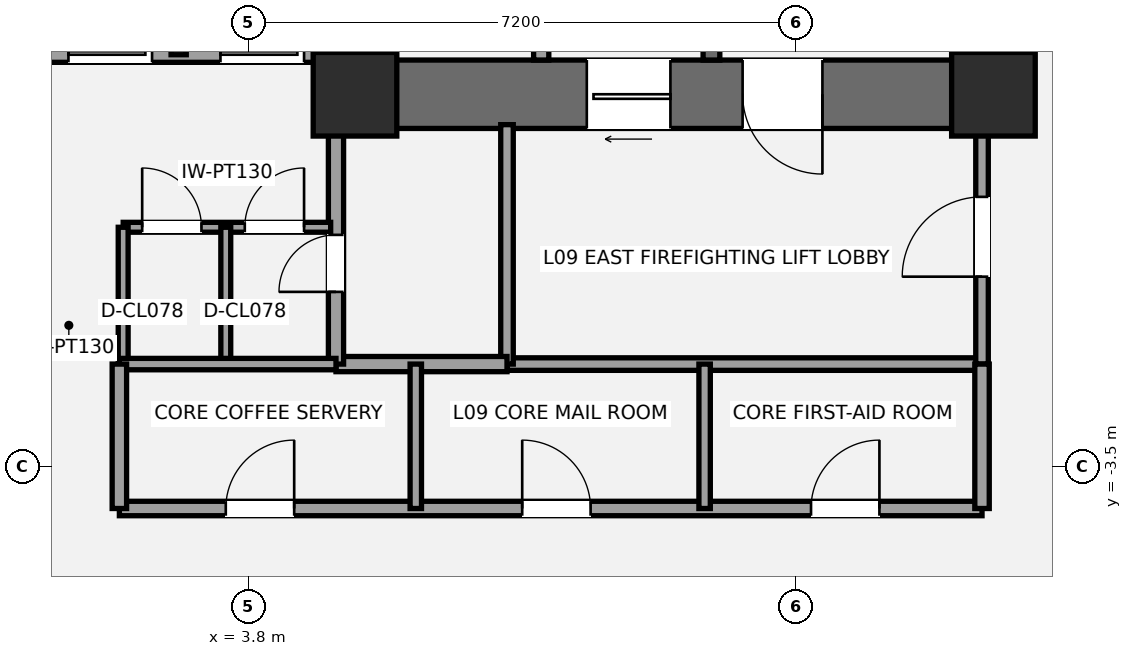
"""IFC4 building model, lengths in metres.
Left out: names, types, materials, properties, quantities, classifications, styles, units other than length and angle.
Written with IfcOpenShell. Run it as: python <this file> out.ifc"""

import sys

from ifc_helpers import new_model, si_unit, direction, frame, frame_2d, origin, origin_2d, place, context, subcontext, project, spatial, rectangle, extrude, element, fill, save


model = new_model("IFC4")
c1 = context("Model", 3, precision=1e-05, world=origin(), true_north=direction((0.0, 1.0)))
c2 = subcontext(c1, "Body", "Model", "MODEL_VIEW")
j1 = project(units=[si_unit("LENGTHUNIT", "METRE"), si_unit("PLANEANGLEUNIT", "RADIAN")], contexts=[c1])
p1 = place(None, origin())
s1 = spatial("IfcSite", under=j1, at=p1, CompositionType="ELEMENT")
p2 = place(p1, origin())
s2 = spatial("IfcBuilding", under=s1, at=p2, CompositionType="ELEMENT")
p3 = place(p2, frame((0.0, 0.0, 37.8)))
s3 = spatial("IfcBuildingStorey", under=s2, at=p3, CompositionType="ELEMENT", Elevation=37.8)
p4 = place(p3, frame((13.6, 0.95, 0.0), z_axis=(0.0, 0.0, 1.0), x_axis=(0.0, 1.0, 0.0)))
e1 = element("IfcWall", 1, at=p4, inside=s3, PredefinedType="SHEAR", context=c2, shape_type="SweptSolid", body=[
    extrude(rectangle(XDim=8.95, YDim=0.9, at=frame_2d((4.475, 0.0))), origin(), (0.0, 0.0, 1.0), 3.6),
])
p5 = place(p3, frame((14.05, 1.4, 0.0), z_axis=(0.0, 0.0, 1.0), x_axis=(-1.0, 0.0, 0.0)))
e2 = element("IfcWall", 2, at=p5, inside=s3, PredefinedType="SHEAR", context=c2, shape_type="SweptSolid", body=[
    extrude(rectangle(XDim=9.3, YDim=0.9, at=frame_2d((4.65, 0.0))), origin(), (0.0, 0.0, 1.0), 3.6),
])
p6 = place(p5, frame((2.7, 0.0, 0.0)))
e3 = element("IfcOpeningElement", 3, at=p6, cuts=e2, PredefinedType="OPENING", context=c2, shape_type="SweptSolid", body=[
    extrude(rectangle(XDim=1.05, YDim=2.15, at=frame_2d((0.525, 1.075))), frame((0.0, 0.46, 0.0), z_axis=(0.0, -1.0, 0.0), x_axis=(1.0, 0.0, 0.0)), (0.0, 0.0, 1.0), 0.92),
])
p7 = place(p5, frame((4.7, 0.0, 0.0)))
e4 = element("IfcOpeningElement", 4, at=p7, cuts=e2, PredefinedType="OPENING", context=c2, shape_type="SweptSolid", body=[
    extrude(rectangle(XDim=1.1, YDim=2.2, at=frame_2d((0.55, 1.1))), frame((0.0, 0.46, 0.0), z_axis=(0.0, -1.0, 0.0), x_axis=(1.0, 0.0, 0.0)), (0.0, 0.0, 1.0), 0.92),
])
p8 = place(p3, frame((5.2, 0.95, 0.0), z_axis=(0.0, 0.0, 1.0), x_axis=(0.0, 1.0, 0.0)))
e5 = element("IfcWall", 5, at=p8, inside=s3, PredefinedType="SHEAR", context=c2, shape_type="SweptSolid", body=[
    extrude(rectangle(XDim=2.85, YDim=0.9, at=frame_2d((1.425, 0.0))), origin(), (0.0, 0.0, 1.0), 3.6),
])
p9 = place(p3, frame((9.89, 1.85, 0.0), z_axis=(0.0, 0.0, 1.0), x_axis=(0.0, 1.0, 0.0)))
e6 = element("IfcWall", 6, at=p9, inside=s3, PredefinedType="SHEAR", context=c2, shape_type="SweptSolid", body=[
    extrude(rectangle(XDim=7.15, YDim=0.22, at=frame_2d((3.575, 0.0))), origin(), (0.0, 0.0, 1.0), 3.6),
])
for number, where, z_axis, x_axis in (
    (7, (5.2, 1.4, 0.0), (0.0, 0.0, 1.0), (1.0, 0.0, 0.0)),
    (8, (13.6, 1.4, 0.0), (0.0, 0.0, 1.0), (1.0, 0.0, 0.0)),
):
    element("IfcColumn", number, at=place(p3, frame(where, z_axis=z_axis, x_axis=x_axis)), inside=s3, PredefinedType="COLUMN", context=c2, shape_type="SweptSolid", body=[
        extrude(rectangle(XDim=1.1, YDim=1.1, at=origin_2d()), origin(), (0.0, 0.0, 1.0), 3.6),
    ])
p10 = place(p3, frame((7.2, -2.15, 0.0), z_axis=(0.0, 0.0, 1.0), x_axis=(1.0, 0.0, 0.0)))
e9 = element("IfcWall", 9, at=p10, inside=s3, PredefinedType="PARTITIONING", context=c2, shape_type="SweptSolid", body=[
    extrude(rectangle(XDim=6.25, YDim=0.165, at=frame_2d((3.125, 0.0))), origin(), (0.0, 0.0, 1.0), 3.4),
])
p11 = place(p3, frame((7.2, -2.15, 0.0), z_axis=(0.0, 0.0, 1.0), x_axis=(0.0, 1.0, 0.0)))
e10 = element("IfcWall", 10, at=p11, inside=s3, PredefinedType="PARTITIONING", context=c2, shape_type="SweptSolid", body=[
    extrude(rectangle(XDim=3.15, YDim=0.165, at=frame_2d((1.575, 0.0))), origin(), (0.0, 0.0, 1.0), 2.853),
])
p12 = place(p3, frame((13.45, -2.15, 0.0), z_axis=(0.0, 0.0, 1.0), x_axis=(0.0, 1.0, 0.0)))
e11 = element("IfcWall", 11, at=p12, inside=s3, PredefinedType="PARTITIONING", context=c2, shape_type="SweptSolid", body=[
    extrude(rectangle(XDim=3.15, YDim=0.165, at=frame_2d((1.575, 0.0))), origin(), (0.0, 0.0, 1.0), 2.853),
])
p13 = place(p12, frame((1.15, 0.0, 0.0)))
e12 = element("IfcOpeningElement", 12, at=p13, cuts=e11, PredefinedType="OPENING", context=c2, shape_type="SweptSolid", body=[
    extrude(rectangle(XDim=1.05, YDim=2.15, at=frame_2d((0.525, 1.075))), frame((0.0, 0.093, 0.0), z_axis=(0.0, -1.0, 0.0), x_axis=(1.0, 0.0, 0.0)), (0.0, 0.0, 1.0), 0.185),
])
p14 = place(p3, frame((4.95, -2.15, 0.0), z_axis=(0.0, 0.0, 1.0), x_axis=(1.0, 0.0, 0.0)))
e13 = element("IfcWall", 13, at=p14, inside=s3, PredefinedType="SOLIDWALL", context=c2, shape_type="SweptSolid", body=[
    extrude(rectangle(XDim=2.25, YDim=0.2, at=frame_2d((1.125, 0.0))), origin(), (0.0, 0.0, 1.0), 3.4),
])
p15 = place(p3, frame((4.95, -2.15, 0.0), z_axis=(0.0, 0.0, 1.0), x_axis=(0.0, 1.0, 0.0)))
e14 = element("IfcWall", 14, at=p15, inside=s3, PredefinedType="SOLIDWALL", context=c2, shape_type="SweptSolid", body=[
    extrude(rectangle(XDim=3.15, YDim=0.2, at=frame_2d((1.575, 0.0))), origin(), (0.0, 0.0, 1.0), 3.4),
])
p16 = place(p15, frame((0.95, 0.0, 0.0)))
e15 = element("IfcOpeningElement", 15, at=p16, cuts=e14, PredefinedType="OPENING", context=c2, shape_type="SweptSolid", body=[
    extrude(rectangle(XDim=0.75, YDim=2.1, at=frame_2d((0.375, 1.05))), frame((0.0, 0.11, 0.0), z_axis=(0.0, -1.0, 0.0), x_axis=(1.0, 0.0, 0.0)), (0.0, 0.0, 1.0), 0.22),
])
p17 = place(p3, frame((2.15, -0.35, 0.0), z_axis=(0.0, 0.0, 1.0), x_axis=(1.0, 0.0, 0.0)))
e16 = element("IfcWall", 16, at=p17, inside=s3, PredefinedType="PARTITIONING", context=c2, shape_type="SweptSolid", body=[
    extrude(rectangle(XDim=2.73, YDim=0.13, at=frame_2d((1.365, 0.0))), origin(), (0.0, 0.0, 1.0), 3.4),
])
p18 = place(p17, frame((0.25, 0.0, 0.0)))
e17 = element("IfcOpeningElement", 17, at=p18, cuts=e16, PredefinedType="OPENING", context=c2, shape_type="SweptSolid", body=[
    extrude(rectangle(XDim=0.78, YDim=2.1, at=frame_2d((0.39, 1.05))), frame((0.0, 0.075, 0.0), z_axis=(0.0, -1.0, 0.0), x_axis=(1.0, 0.0, 0.0)), (0.0, 0.0, 1.0), 0.15),
])
p19 = place(p17, frame((1.6, 0.0, 0.0)))
e18 = element("IfcOpeningElement", 18, at=p19, cuts=e16, PredefinedType="OPENING", context=c2, shape_type="SweptSolid", body=[
    extrude(rectangle(XDim=0.78, YDim=2.1, at=frame_2d((0.39, 1.05))), frame((0.0, 0.075, 0.0), z_axis=(0.0, -1.0, 0.0), x_axis=(1.0, 0.0, 0.0)), (0.0, 0.0, 1.0), 0.15),
])
for number, where, z_axis, x_axis in (
    (19, (2.15, -2.15, 0.0), (0.0, 0.0, 1.0), (0.0, 1.0, 0.0)),
    (20, (3.5, -2.15, 0.0), (0.0, 0.0, 1.0), (0.0, 1.0, 0.0)),
):
    element("IfcWall", number, at=place(p3, frame(where, z_axis=z_axis, x_axis=x_axis)), inside=s3, PredefinedType="PARTITIONING", context=c2, shape_type="SweptSolid", body=[
        extrude(rectangle(XDim=1.8, YDim=0.13, at=frame_2d((0.9, 0.0))), origin(), (0.0, 0.0, 1.0), 3.4),
    ])
p20 = place(p3, frame((7.65, 1.85, 0.0), z_axis=(0.0, 0.0, 1.0), x_axis=(0.0, 1.0, 0.0)))
e21 = element("IfcWall", 21, at=p20, inside=s3, PredefinedType="SOLIDWALL", context=c2, shape_type="SweptSolid", body=[
    extrude(rectangle(XDim=1.97, YDim=0.2, at=frame_2d((0.985, 0.0))), origin(), (0.0, 0.0, 1.0), 3.4),
])
p21 = place(p3, frame((0.88, 1.92, 0.0), z_axis=(0.0, 0.0, 1.0), x_axis=(1.0, 0.0, 0.0)))
e22 = element("IfcWall", 22, at=p21, inside=s3, PredefinedType="SOLIDWALL", context=c2, shape_type="SweptSolid", body=[
    extrude(rectangle(XDim=3.86, YDim=0.2, at=frame_2d((1.93, 0.0))), origin(), (0.0, 0.0, 1.0), 2.39),
])
p22 = place(p21, frame((0.55, 0.0, 0.0)))
e23 = element("IfcOpeningElement", 23, at=p22, cuts=e22, PredefinedType="OPENING", context=c2, shape_type="SweptSolid", body=[
    extrude(rectangle(XDim=1.1, YDim=2.2, at=frame_2d((0.55, 1.1))), frame((0.0, 0.11, 0.0), z_axis=(0.0, -1.0, 0.0), x_axis=(1.0, 0.0, 0.0)), (0.0, 0.0, 1.0), 0.22),
])
p23 = place(p21, frame((2.55, 0.0, 0.0)))
e24 = element("IfcOpeningElement", 24, at=p23, cuts=e22, PredefinedType="OPENING", context=c2, shape_type="SweptSolid", body=[
    extrude(rectangle(XDim=1.1, YDim=2.2, at=frame_2d((0.55, 1.1))), frame((0.0, 0.11, 0.0), z_axis=(0.0, -1.0, 0.0), x_axis=(1.0, 0.0, 0.0)), (0.0, 0.0, 1.0), 0.22),
])
p24 = place(p3, frame((2.88, 1.92, 0.0), z_axis=(0.0, 0.0, 1.0), x_axis=(0.0, 1.0, 0.0)))
e25 = element("IfcWall", 25, at=p24, inside=s3, PredefinedType="SOLIDWALL", context=c2, shape_type="SweptSolid", body=[
    extrude(rectangle(XDim=1.82, YDim=0.2, at=frame_2d((0.91, 0.0))), origin(), (0.0, 0.0, 1.0), 3.4),
])
p25 = place(p3, frame((2.1, -4.05, 0.0), z_axis=(0.0, 0.0, 1.0), x_axis=(1.0, 0.0, 0.0)))
e26 = element("IfcWall", 26, at=p25, inside=s3, PredefinedType="PLUMBINGWALL", context=c2, shape_type="SweptSolid", body=[
    extrude(rectangle(XDim=11.35, YDim=0.19, at=frame_2d((5.675, 0.0))), origin(), (0.0, 0.0, 1.0), 2.933),
])
p26 = place(p25, frame((1.4, 0.0, 0.0)))
e27 = element("IfcOpeningElement", 27, at=p26, cuts=e26, PredefinedType="OPENING", context=c2, shape_type="SweptSolid", body=[
    extrude(rectangle(XDim=0.9, YDim=2.1, at=frame_2d((0.45, 1.05))), frame((0.0, 0.105, 0.0), z_axis=(0.0, -1.0, 0.0), x_axis=(1.0, 0.0, 0.0)), (0.0, 0.0, 1.0), 0.21),
])
p27 = place(p25, frame((5.3, 0.0, 0.0)))
e28 = element("IfcOpeningElement", 28, at=p27, cuts=e26, PredefinedType="OPENING", context=c2, shape_type="SweptSolid", body=[
    extrude(rectangle(XDim=0.9, YDim=2.1, at=frame_2d((0.45, 1.05))), frame((0.0, 0.105, 0.0), z_axis=(0.0, -1.0, 0.0), x_axis=(1.0, 0.0, 0.0)), (0.0, 0.0, 1.0), 0.21),
])
p28 = place(p25, frame((9.1, 0.0, 0.0)))
e29 = element("IfcOpeningElement", 29, at=p28, cuts=e26, PredefinedType="OPENING", context=c2, shape_type="SweptSolid", body=[
    extrude(rectangle(XDim=0.9, YDim=2.1, at=frame_2d((0.45, 1.05))), frame((0.0, 0.105, 0.0), z_axis=(0.0, -1.0, 0.0), x_axis=(1.0, 0.0, 0.0)), (0.0, 0.0, 1.0), 0.21),
])
p29 = place(p3, frame((2.1, -2.15, 0.0), z_axis=(0.0, 0.0, 1.0), x_axis=(1.0, 0.0, 0.0)))
e30 = element("IfcWall", 30, at=p29, inside=s3, PredefinedType="PLUMBINGWALL", context=c2, shape_type="SweptSolid", body=[
    extrude(rectangle(XDim=2.85, YDim=0.15, at=frame_2d((1.425, 0.0))), origin(), (0.0, 0.0, 1.0), 3.4),
])
p30 = place(p3, frame((2.1, -4.05, 0.0), z_axis=(0.0, 0.0, 1.0), x_axis=(0.0, 1.0, 0.0)))
e31 = element("IfcWall", 31, at=p30, inside=s3, PredefinedType="PLUMBINGWALL", context=c2, shape_type="SweptSolid", body=[
    extrude(rectangle(XDim=1.9, YDim=0.19, at=frame_2d((0.95, 0.0))), origin(), (0.0, 0.0, 1.0), 3.4),
])
p31 = place(p3, frame((13.45, -4.05, 0.0), z_axis=(0.0, 0.0, 1.0), x_axis=(0.0, 1.0, 0.0)))
e32 = element("IfcWall", 32, at=p31, inside=s3, PredefinedType="PLUMBINGWALL", context=c2, shape_type="SweptSolid", body=[
    extrude(rectangle(XDim=1.9, YDim=0.19, at=frame_2d((0.95, 0.0))), origin(), (0.0, 0.0, 1.0), 2.853),
])
p32 = place(p3, frame((6.0, -4.05, 0.0), z_axis=(0.0, 0.0, 1.0), x_axis=(0.0, 1.0, 0.0)))
e33 = element("IfcWall", 33, at=p32, inside=s3, PredefinedType="PLUMBINGWALL", context=c2, shape_type="SweptSolid", body=[
    extrude(rectangle(XDim=1.9, YDim=0.15, at=frame_2d((0.95, 0.0))), origin(), (0.0, 0.0, 1.0), 2.841),
])
p33 = place(p3, frame((9.8, -4.05, 0.0), z_axis=(0.0, 0.0, 1.0), x_axis=(0.0, 1.0, 0.0)))
e34 = element("IfcWall", 34, at=p33, inside=s3, PredefinedType="PLUMBINGWALL", context=c2, shape_type="SweptSolid", body=[
    extrude(rectangle(XDim=1.9, YDim=0.15, at=frame_2d((0.95, 0.0))), origin(), (0.0, 0.0, 1.0), 2.853),
])
p34 = place(p6, origin())
e35 = element("IfcDoor", 35, at=p34, inside=s3, OperationType="SINGLE_SWING_LEFT", PredefinedType="DOOR", context=c2, shape_type="SweptSolid", body=[
    extrude(rectangle(XDim=1.05, YDim=2.15, at=frame_2d((0.525, 1.075))), frame((0.0, 0.025, 0.0), z_axis=(0.0, -1.0, 0.0), x_axis=(1.0, 0.0, 0.0)), (0.0, 0.0, 1.0), 0.05),
])
fill(e3, e35)
p35 = place(p13, origin())
e36 = element("IfcDoor", 36, at=p35, inside=s3, OperationType="SINGLE_SWING_LEFT", PredefinedType="DOOR", context=c2, shape_type="SweptSolid", body=[
    extrude(rectangle(XDim=1.05, YDim=2.15, at=frame_2d((0.525, 1.075))), frame((0.0, 0.025, 0.0), z_axis=(0.0, -1.0, 0.0), x_axis=(1.0, 0.0, 0.0)), (0.0, 0.0, 1.0), 0.05),
])
fill(e12, e36)
p36 = place(p16, origin())
e37 = element("IfcDoor", 37, at=p36, inside=s3, OperationType="SINGLE_SWING_LEFT", PredefinedType="DOOR", context=c2, shape_type="SweptSolid", body=[
    extrude(rectangle(XDim=0.75, YDim=2.1, at=frame_2d((0.375, 1.05))), frame((0.0, 0.025, 0.0), z_axis=(0.0, -1.0, 0.0), x_axis=(1.0, 0.0, 0.0)), (0.0, 0.0, 1.0), 0.05),
])
fill(e15, e37)
p37 = place(p18, origin())
e38 = element("IfcDoor", 38, at=p37, inside=s3, OperationType="SINGLE_SWING_LEFT", PredefinedType="DOOR", context=c2, shape_type="SweptSolid", body=[
    extrude(rectangle(XDim=0.78, YDim=2.1, at=frame_2d((0.39, 1.05))), frame((0.0, 0.025, 0.0), z_axis=(0.0, -1.0, 0.0), x_axis=(1.0, 0.0, 0.0)), (0.0, 0.0, 1.0), 0.05),
])
fill(e17, e38)
p38 = place(p19, origin())
e39 = element("IfcDoor", 39, at=p38, inside=s3, OperationType="SINGLE_SWING_RIGHT", PredefinedType="DOOR", context=c2, shape_type="SweptSolid", body=[
    extrude(rectangle(XDim=0.78, YDim=2.1, at=frame_2d((0.39, 1.05))), frame((0.0, 0.025, 0.0), z_axis=(0.0, -1.0, 0.0), x_axis=(1.0, 0.0, 0.0)), (0.0, 0.0, 1.0), 0.05),
])
fill(e18, e39)
p39 = place(p7, origin())
e40 = element("IfcDoor", 40, at=p39, inside=s3, OperationType="SLIDING_TO_LEFT", PredefinedType="DOOR", context=c2, shape_type="SweptSolid", body=[
    extrude(rectangle(XDim=1.1, YDim=2.2, at=frame_2d((0.55, 1.1))), frame((0.0, 0.025, 0.0), z_axis=(0.0, -1.0, 0.0), x_axis=(1.0, 0.0, 0.0)), (0.0, 0.0, 1.0), 0.05),
])
fill(e4, e40)
p40 = place(p22, origin())
e41 = element("IfcDoor", 41, at=p40, inside=s3, OperationType="SLIDING_TO_LEFT", PredefinedType="DOOR", context=c2, shape_type="SweptSolid", body=[
    extrude(rectangle(XDim=1.1, YDim=2.2, at=frame_2d((0.55, 1.1))), frame((0.0, 0.025, 0.0), z_axis=(0.0, -1.0, 0.0), x_axis=(1.0, 0.0, 0.0)), (0.0, 0.0, 1.0), 0.05),
])
fill(e23, e41)
p41 = place(p23, origin())
e42 = element("IfcDoor", 42, at=p41, inside=s3, OperationType="SLIDING_TO_LEFT", PredefinedType="DOOR", context=c2, shape_type="SweptSolid", body=[
    extrude(rectangle(XDim=1.1, YDim=2.2, at=frame_2d((0.55, 1.1))), frame((0.0, 0.025, 0.0), z_axis=(0.0, -1.0, 0.0), x_axis=(1.0, 0.0, 0.0)), (0.0, 0.0, 1.0), 0.05),
])
fill(e24, e42)
p42 = place(p26, origin())
e43 = element("IfcDoor", 43, at=p42, inside=s3, OperationType="SINGLE_SWING_RIGHT", PredefinedType="DOOR", context=c2, shape_type="SweptSolid", body=[
    extrude(rectangle(XDim=0.9, YDim=2.1, at=frame_2d((0.45, 1.05))), frame((0.0, 0.025, 0.0), z_axis=(0.0, -1.0, 0.0), x_axis=(1.0, 0.0, 0.0)), (0.0, 0.0, 1.0), 0.05),
])
fill(e27, e43)
p43 = place(p27, origin())
e44 = element("IfcDoor", 44, at=p43, inside=s3, OperationType="SINGLE_SWING_LEFT", PredefinedType="DOOR", context=c2, shape_type="SweptSolid", body=[
    extrude(rectangle(XDim=0.9, YDim=2.1, at=frame_2d((0.45, 1.05))), frame((0.0, 0.025, 0.0), z_axis=(0.0, -1.0, 0.0), x_axis=(1.0, 0.0, 0.0)), (0.0, 0.0, 1.0), 0.05),
])
fill(e28, e44)
p44 = place(p28, origin())
e45 = element("IfcDoor", 45, at=p44, inside=s3, OperationType="SINGLE_SWING_RIGHT", PredefinedType="DOOR", context=c2, shape_type="SweptSolid", body=[
    extrude(rectangle(XDim=0.9, YDim=2.1, at=frame_2d((0.45, 1.05))), frame((0.0, 0.025, 0.0), z_axis=(0.0, -1.0, 0.0), x_axis=(1.0, 0.0, 0.0)), (0.0, 0.0, 1.0), 0.05),
])
fill(e29, e45)
save(model, sys.argv[1])
